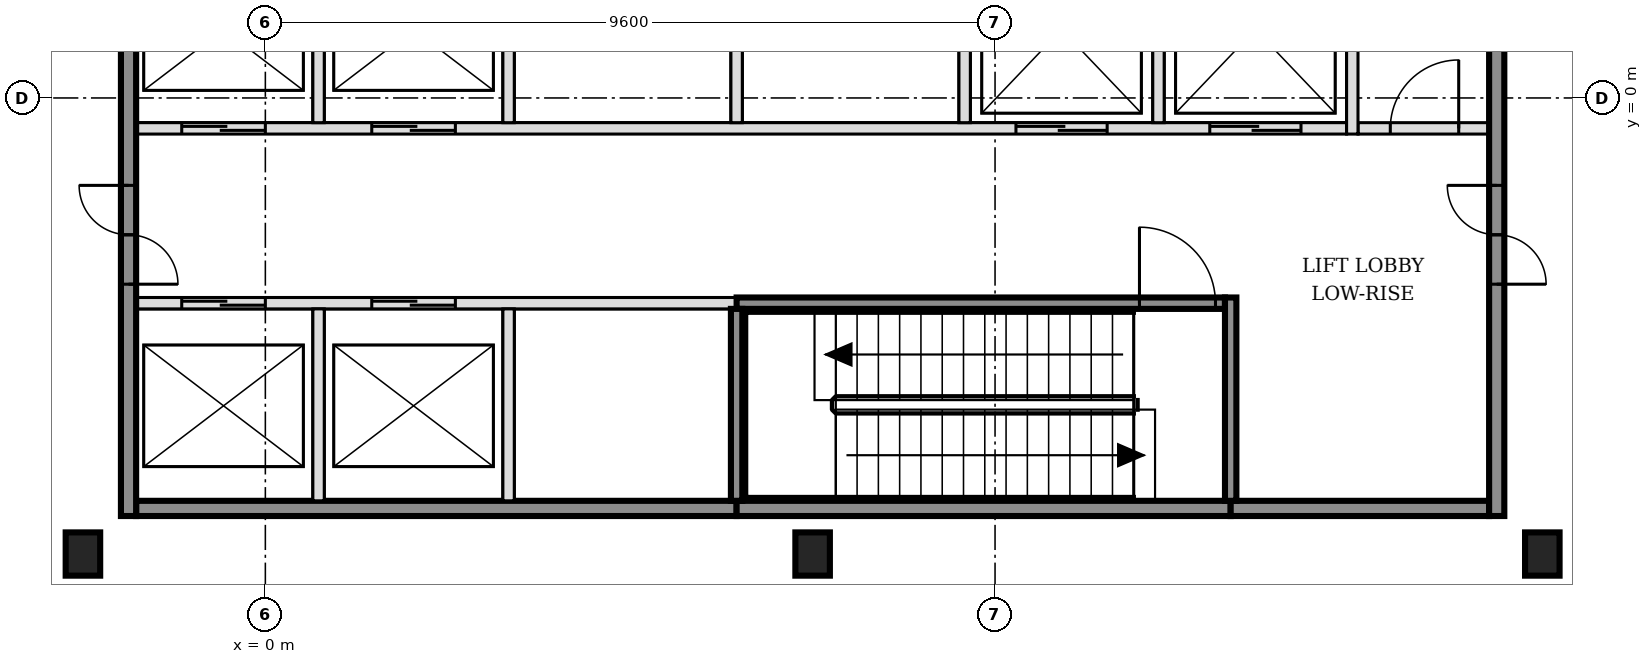
"""IFC4 building model, lengths in metres.
Left out: names, types, materials, properties, quantities, classifications, styles, units other than length and angle.
Written with IfcOpenShell. Run it as: python <this file> out.ifc"""

import sys

from ifc_helpers import new_model, si_unit, direction, frame, frame_2d, origin, origin_2d, place, context, subcontext, project, spatial, rectangle, i_section, extrude, element, fill, save


model = new_model("IFC4")
c1 = context("Model", 3, precision=1e-05, world=origin(), true_north=direction((0.0, 1.0)))
c2 = subcontext(c1, "Body", "Model", "MODEL_VIEW")
j1 = project(units=[si_unit("LENGTHUNIT", "METRE"), si_unit("PLANEANGLEUNIT", "RADIAN")], contexts=[c1])
p1 = place(None, origin())
s1 = spatial("IfcSite", under=j1, at=p1, CompositionType="ELEMENT")
p2 = place(p1, origin())
s2 = spatial("IfcBuilding", under=s1, at=p2, CompositionType="ELEMENT")
p3 = place(p2, frame((0.0, 0.0, 21.0)))
s3 = spatial("IfcBuildingStorey", under=s2, at=p3, CompositionType="ELEMENT", Elevation=21.0)
for number, where, z_axis, x_axis in (
    (1, (-2.4, -6.0, -0.2), (0.0, 0.0, 1.0), (1.0, 0.0, 0.0)),
    (2, (7.2, -6.0, -0.2), (0.0, 0.0, 1.0), (1.0, 0.0, 0.0)),
    (3, (16.8, -6.0, -0.2), (0.0, 0.0, 1.0), (1.0, 0.0, 0.0)),
):
    element("IfcColumn", number, at=place(p3, frame(where, z_axis=z_axis, x_axis=x_axis)), inside=s3, PredefinedType="COLUMN", context=c2, shape_type="SweptSolid", body=[
        extrude(i_section(OverallWidth=0.454, OverallDepth=0.569, WebThickness=0.078, FlangeThickness=0.125, FilletRadius=0.015, at=origin_2d()), origin(), (0.0, 0.0, 1.0), 4.8),
    ])
p4 = place(p3, frame((-1.7, -5.4, 0.0), z_axis=(0.0, 0.0, 1.0), x_axis=(1.0, 0.0, 0.0)))
e4 = element("IfcWall", 4, at=p4, inside=s3, PredefinedType="SOLIDWALL", context=c2, shape_type="SweptSolid", body=[
    extrude(rectangle(XDim=7.9, YDim=0.2, at=frame_2d((3.95, 0.0))), origin(), (0.0, 0.0, 1.0), 4.6),
])
p5 = place(p3, frame((6.2, -5.4, 0.0), z_axis=(0.0, 0.0, 1.0), x_axis=(1.0, 0.0, 0.0)))
e5 = element("IfcWall", 5, at=p5, inside=s3, PredefinedType="SOLIDWALL", context=c2, shape_type="SweptSolid", body=[
    extrude(rectangle(XDim=6.5, YDim=0.2, at=frame_2d((3.25, 0.0))), origin(), (0.0, 0.0, 1.0), 4.6),
])
p6 = place(p3, frame((12.7, -5.4, 0.0), z_axis=(0.0, 0.0, 1.0), x_axis=(1.0, 0.0, 0.0)))
e6 = element("IfcWall", 6, at=p6, inside=s3, PredefinedType="SOLIDWALL", context=c2, shape_type="SweptSolid", body=[
    extrude(rectangle(XDim=3.4, YDim=0.2, at=frame_2d((1.7, 0.0))), origin(), (0.0, 0.0, 1.0), 4.6),
])
p7 = place(p3, frame((-1.7, -2.7, 0.0), z_axis=(0.0, 0.0, 1.0), x_axis=(1.0, 0.0, 0.0)))
e7 = element("IfcWall", 7, at=p7, inside=s3, PredefinedType="SOLIDWALL", context=c2, shape_type="SweptSolid", body=[
    extrude(rectangle(XDim=7.9, YDim=0.15, at=frame_2d((3.95, 0.0))), origin(), (0.0, 0.0, 1.0), 4.6),
])
p8 = place(p7, frame((0.6, 0.0, 0.0)))
e8 = element("IfcOpeningElement", 8, at=p8, cuts=e7, PredefinedType="OPENING", context=c2, shape_type="SweptSolid", body=[
    extrude(rectangle(XDim=1.1, YDim=2.1, at=frame_2d((0.55, 1.05))), frame((0.0, 0.085, 0.0), z_axis=(0.0, -1.0, 0.0), x_axis=(1.0, 0.0, 0.0)), (0.0, 0.0, 1.0), 0.17),
])
p9 = place(p7, frame((3.1, 0.0, 0.0)))
e9 = element("IfcOpeningElement", 9, at=p9, cuts=e7, PredefinedType="OPENING", context=c2, shape_type="SweptSolid", body=[
    extrude(rectangle(XDim=1.1, YDim=2.1, at=frame_2d((0.55, 1.05))), frame((0.0, 0.085, 0.0), z_axis=(0.0, -1.0, 0.0), x_axis=(1.0, 0.0, 0.0)), (0.0, 0.0, 1.0), 0.17),
])
p10 = place(p3, frame((6.2, -2.7, 0.0), z_axis=(0.0, 0.0, 1.0), x_axis=(1.0, 0.0, 0.0)))
e10 = element("IfcWall", 10, at=p10, inside=s3, PredefinedType="SOLIDWALL", context=c2, shape_type="SweptSolid", body=[
    extrude(rectangle(XDim=6.425, YDim=0.15, at=frame_2d((3.212, 0.0))), origin(), (0.0, 0.0, 1.0), 4.6),
])
p11 = place(p10, frame((5.3, 0.0, 0.0)))
e11 = element("IfcOpeningElement", 11, at=p11, cuts=e10, PredefinedType="OPENING", context=c2, shape_type="SweptSolid", body=[
    extrude(rectangle(XDim=1.0, YDim=2.1, at=frame_2d((0.5, 1.05))), frame((0.0, 0.085, 0.0), z_axis=(0.0, -1.0, 0.0), x_axis=(1.0, 0.0, 0.0)), (0.0, 0.0, 1.0), 0.17),
])
p12 = place(p3, frame((-1.7, -0.4, 0.0), z_axis=(0.0, 0.0, 1.0), x_axis=(1.0, 0.0, 0.0)))
e12 = element("IfcWall", 12, at=p12, inside=s3, PredefinedType="SOLIDWALL", context=c2, shape_type="SweptSolid", body=[
    extrude(rectangle(XDim=15.925, YDim=0.15, at=frame_2d((7.962, 0.0))), origin(), (0.0, 0.0, 1.0), 4.6),
])
p13 = place(p12, frame((0.6, 0.0, 0.0)))
e13 = element("IfcOpeningElement", 13, at=p13, cuts=e12, PredefinedType="OPENING", context=c2, shape_type="SweptSolid", body=[
    extrude(rectangle(XDim=1.1, YDim=2.1, at=frame_2d((0.55, 1.05))), frame((0.0, 0.085, 0.0), z_axis=(0.0, -1.0, 0.0), x_axis=(1.0, 0.0, 0.0)), (0.0, 0.0, 1.0), 0.17),
])
p14 = place(p12, frame((3.1, 0.0, 0.0)))
e14 = element("IfcOpeningElement", 14, at=p14, cuts=e12, PredefinedType="OPENING", context=c2, shape_type="SweptSolid", body=[
    extrude(rectangle(XDim=1.1, YDim=2.1, at=frame_2d((0.55, 1.05))), frame((0.0, 0.085, 0.0), z_axis=(0.0, -1.0, 0.0), x_axis=(1.0, 0.0, 0.0)), (0.0, 0.0, 1.0), 0.17),
])
p15 = place(p12, frame((11.575, 0.0, 0.0)))
e15 = element("IfcOpeningElement", 15, at=p15, cuts=e12, PredefinedType="OPENING", context=c2, shape_type="SweptSolid", body=[
    extrude(rectangle(XDim=1.2, YDim=2.1, at=frame_2d((0.6, 1.05))), frame((0.0, 0.085, 0.0), z_axis=(0.0, -1.0, 0.0), x_axis=(1.0, 0.0, 0.0)), (0.0, 0.0, 1.0), 0.17),
])
p16 = place(p12, frame((14.125, 0.0, 0.0)))
e16 = element("IfcOpeningElement", 16, at=p16, cuts=e12, PredefinedType="OPENING", context=c2, shape_type="SweptSolid", body=[
    extrude(rectangle(XDim=1.2, YDim=2.1, at=frame_2d((0.6, 1.05))), frame((0.0, 0.085, 0.0), z_axis=(0.0, -1.0, 0.0), x_axis=(1.0, 0.0, 0.0)), (0.0, 0.0, 1.0), 0.17),
])
p17 = place(p3, frame((14.375, -0.4, 0.0), z_axis=(0.0, 0.0, 1.0), x_axis=(1.0, 0.0, 0.0)))
e17 = element("IfcWall", 17, at=p17, inside=s3, PredefinedType="PARTITIONING", context=c2, shape_type="SweptSolid", body=[
    extrude(rectangle(XDim=1.725, YDim=0.15, at=frame_2d((0.863, 0.0))), origin(), (0.0, 0.0, 1.0), 4.6),
])
p18 = place(p17, frame((0.425, 0.0, 0.0)))
e18 = element("IfcOpeningElement", 18, at=p18, cuts=e17, PredefinedType="OPENING", context=c2, shape_type="SweptSolid", body=[
    extrude(rectangle(XDim=0.9, YDim=2.1, at=frame_2d((0.45, 1.05))), frame((0.0, 0.085, 0.0), z_axis=(0.0, -1.0, 0.0), x_axis=(1.0, 0.0, 0.0)), (0.0, 0.0, 1.0), 0.17),
])
p19 = place(p3, frame((-1.8, -5.5, 0.0), z_axis=(0.0, 0.0, 1.0), x_axis=(0.0, 1.0, 0.0)))
e19 = element("IfcWall", 19, at=p19, inside=s3, PredefinedType="SOLIDWALL", context=c2, shape_type="SweptSolid", body=[
    extrude(rectangle(XDim=15.8, YDim=0.2, at=frame_2d((7.9, 0.0))), origin(), (0.0, 0.0, 1.0), 4.6),
])
p20 = place(p19, frame((3.05, 0.0, 0.0)))
e20 = element("IfcOpeningElement", 20, at=p20, cuts=e19, PredefinedType="OPENING", context=c2, shape_type="SweptSolid", body=[
    extrude(rectangle(XDim=1.3, YDim=2.1, at=frame_2d((0.65, 1.05))), frame((0.0, 0.11, 0.0), z_axis=(0.0, -1.0, 0.0), x_axis=(1.0, 0.0, 0.0)), (0.0, 0.0, 1.0), 0.22),
])
p21 = place(p19, frame((11.45, 0.0, 0.0)))
e21 = element("IfcOpeningElement", 21, at=p21, cuts=e19, PredefinedType="OPENING", context=c2, shape_type="SweptSolid", body=[
    extrude(rectangle(XDim=1.3, YDim=2.1, at=frame_2d((0.65, 1.05))), frame((0.0, 0.11, 0.0), z_axis=(0.0, -1.0, 0.0), x_axis=(1.0, 0.0, 0.0)), (0.0, 0.0, 1.0), 0.22),
])
p22 = place(p3, frame((0.7, -5.3, 0.0), z_axis=(0.0, 0.0, 1.0), x_axis=(0.0, 1.0, 0.0)))
e22 = element("IfcWall", 22, at=p22, inside=s3, PredefinedType="SOLIDWALL", context=c2, shape_type="SweptSolid", body=[
    extrude(rectangle(XDim=2.525, YDim=0.15, at=frame_2d((1.263, 0.0))), origin(), (0.0, 0.0, 1.0), 4.6),
])
p23 = place(p3, frame((0.7, -0.325, 0.0), z_axis=(0.0, 0.0, 1.0), x_axis=(0.0, 1.0, 0.0)))
e23 = element("IfcWall", 23, at=p23, inside=s3, PredefinedType="SOLIDWALL", context=c2, shape_type="SweptSolid", body=[
    extrude(rectangle(XDim=2.45, YDim=0.15, at=frame_2d((1.225, 0.0))), origin(), (0.0, 0.0, 1.0), 4.6),
])
p24 = place(p3, frame((3.2, -5.3, 0.0), z_axis=(0.0, 0.0, 1.0), x_axis=(0.0, 1.0, 0.0)))
e24 = element("IfcWall", 24, at=p24, inside=s3, PredefinedType="SOLIDWALL", context=c2, shape_type="SweptSolid", body=[
    extrude(rectangle(XDim=2.525, YDim=0.15, at=frame_2d((1.263, 0.0))), origin(), (0.0, 0.0, 1.0), 4.6),
])
p25 = place(p3, frame((3.2, -0.325, 0.0), z_axis=(0.0, 0.0, 1.0), x_axis=(0.0, 1.0, 0.0)))
e25 = element("IfcWall", 25, at=p25, inside=s3, PredefinedType="SOLIDWALL", context=c2, shape_type="SweptSolid", body=[
    extrude(rectangle(XDim=2.45, YDim=0.15, at=frame_2d((1.225, 0.0))), origin(), (0.0, 0.0, 1.0), 4.6),
])
p26 = place(p3, frame((6.2, -5.3, 0.0), z_axis=(0.0, 0.0, 1.0), x_axis=(0.0, 1.0, 0.0)))
e26 = element("IfcWall", 26, at=p26, inside=s3, PredefinedType="SOLIDWALL", context=c2, shape_type="SweptSolid", body=[
    extrude(rectangle(XDim=2.525, YDim=0.15, at=frame_2d((1.263, 0.0))), origin(), (0.0, 0.0, 1.0), 4.6),
])
for number, where, z_axis, x_axis in (
    (27, (6.2, -0.325, 0.0), (0.0, 0.0, 1.0), (0.0, 1.0, 0.0)),
    (28, (9.2, -0.325, 0.0), (0.0, 0.0, 1.0), (0.0, 1.0, 0.0)),
    (29, (11.75, -0.325, 0.0), (0.0, 0.0, 1.0), (0.0, 1.0, 0.0)),
):
    element("IfcWall", number, at=place(p3, frame(where, z_axis=z_axis, x_axis=x_axis)), inside=s3, PredefinedType="SOLIDWALL", context=c2, shape_type="SweptSolid", body=[
        extrude(rectangle(XDim=2.45, YDim=0.15, at=frame_2d((1.225, 0.0))), origin(), (0.0, 0.0, 1.0), 4.6),
    ])
p27 = place(p3, frame((12.7, -5.3, 0.0), z_axis=(0.0, 0.0, 1.0), x_axis=(0.0, 1.0, 0.0)))
e30 = element("IfcWall", 30, at=p27, inside=s3, PredefinedType="SOLIDWALL", context=c2, shape_type="SweptSolid", body=[
    extrude(rectangle(XDim=2.675, YDim=0.15, at=frame_2d((1.337, 0.0))), origin(), (0.0, 0.0, 1.0), 4.6),
])
p28 = place(p3, frame((14.3, -0.475, 0.0), z_axis=(0.0, 0.0, 1.0), x_axis=(0.0, 1.0, 0.0)))
e31 = element("IfcWall", 31, at=p28, inside=s3, PredefinedType="SOLIDWALL", context=c2, shape_type="SweptSolid", body=[
    extrude(rectangle(XDim=2.75, YDim=0.15, at=frame_2d((1.375, 0.0))), origin(), (0.0, 0.0, 1.0), 4.6),
])
p29 = place(p3, frame((16.2, -5.5, 0.0), z_axis=(0.0, 0.0, 1.0), x_axis=(0.0, 1.0, 0.0)))
e32 = element("IfcWall", 32, at=p29, inside=s3, PredefinedType="SOLIDWALL", context=c2, shape_type="SweptSolid", body=[
    extrude(rectangle(XDim=15.8, YDim=0.2, at=frame_2d((7.9, 0.0))), origin(), (0.0, 0.0, 1.0), 4.6),
])
p30 = place(p29, frame((3.05, 0.0, 0.0)))
e33 = element("IfcOpeningElement", 33, at=p30, cuts=e32, PredefinedType="OPENING", context=c2, shape_type="SweptSolid", body=[
    extrude(rectangle(XDim=1.3, YDim=2.1, at=frame_2d((0.65, 1.05))), frame((0.0, 0.11, 0.0), z_axis=(0.0, -1.0, 0.0), x_axis=(1.0, 0.0, 0.0)), (0.0, 0.0, 1.0), 0.22),
])
p31 = place(p29, frame((11.45, 0.0, 0.0)))
e34 = element("IfcOpeningElement", 34, at=p31, cuts=e32, PredefinedType="OPENING", context=c2, shape_type="SweptSolid", body=[
    extrude(rectangle(XDim=1.3, YDim=2.1, at=frame_2d((0.65, 1.05))), frame((0.0, 0.11, 0.0), z_axis=(0.0, -1.0, 0.0), x_axis=(1.0, 0.0, 0.0)), (0.0, 0.0, 1.0), 0.22),
])
p32 = place(p8, origin())
e35 = element("IfcDoor", 35, at=p32, inside=s3, OperationType="DOUBLE_DOOR_SLIDING", PredefinedType="DOOR", context=c2, shape_type="SweptSolid", body=[
    extrude(rectangle(XDim=1.1, YDim=2.1, at=frame_2d((0.55, 1.05))), frame((0.0, 0.025, 0.0), z_axis=(0.0, -1.0, 0.0), x_axis=(1.0, 0.0, 0.0)), (0.0, 0.0, 1.0), 0.05),
])
fill(e8, e35)
p33 = place(p9, origin())
e36 = element("IfcDoor", 36, at=p33, inside=s3, OperationType="DOUBLE_DOOR_SLIDING", PredefinedType="DOOR", context=c2, shape_type="SweptSolid", body=[
    extrude(rectangle(XDim=1.1, YDim=2.1, at=frame_2d((0.55, 1.05))), frame((0.0, 0.025, 0.0), z_axis=(0.0, -1.0, 0.0), x_axis=(1.0, 0.0, 0.0)), (0.0, 0.0, 1.0), 0.05),
])
fill(e9, e36)
p34 = place(p13, origin())
e37 = element("IfcDoor", 37, at=p34, inside=s3, OperationType="DOUBLE_DOOR_SLIDING", PredefinedType="DOOR", context=c2, shape_type="SweptSolid", body=[
    extrude(rectangle(XDim=1.1, YDim=2.1, at=frame_2d((0.55, 1.05))), frame((0.0, 0.025, 0.0), z_axis=(0.0, -1.0, 0.0), x_axis=(1.0, 0.0, 0.0)), (0.0, 0.0, 1.0), 0.05),
])
fill(e13, e37)
p35 = place(p14, origin())
e38 = element("IfcDoor", 38, at=p35, inside=s3, OperationType="DOUBLE_DOOR_SLIDING", PredefinedType="DOOR", context=c2, shape_type="SweptSolid", body=[
    extrude(rectangle(XDim=1.1, YDim=2.1, at=frame_2d((0.55, 1.05))), frame((0.0, 0.025, 0.0), z_axis=(0.0, -1.0, 0.0), x_axis=(1.0, 0.0, 0.0)), (0.0, 0.0, 1.0), 0.05),
])
fill(e14, e38)
p36 = place(p15, origin())
e39 = element("IfcDoor", 39, at=p36, inside=s3, OperationType="DOUBLE_DOOR_SLIDING", PredefinedType="DOOR", context=c2, shape_type="SweptSolid", body=[
    extrude(rectangle(XDim=1.2, YDim=2.1, at=frame_2d((0.6, 1.05))), frame((0.0, 0.025, 0.0), z_axis=(0.0, -1.0, 0.0), x_axis=(1.0, 0.0, 0.0)), (0.0, 0.0, 1.0), 0.05),
])
fill(e15, e39)
p37 = place(p16, origin())
e40 = element("IfcDoor", 40, at=p37, inside=s3, OperationType="DOUBLE_DOOR_SLIDING", PredefinedType="DOOR", context=c2, shape_type="SweptSolid", body=[
    extrude(rectangle(XDim=1.2, YDim=2.1, at=frame_2d((0.6, 1.05))), frame((0.0, 0.025, 0.0), z_axis=(0.0, -1.0, 0.0), x_axis=(1.0, 0.0, 0.0)), (0.0, 0.0, 1.0), 0.05),
])
fill(e16, e40)
p38 = place(p11, origin())
e41 = element("IfcDoor", 41, at=p38, inside=s3, OperationType="SINGLE_SWING_LEFT", PredefinedType="DOOR", context=c2, shape_type="SweptSolid", body=[
    extrude(rectangle(XDim=1.0, YDim=2.1, at=frame_2d((0.5, 1.05))), frame((0.0, 0.025, 0.0), z_axis=(0.0, -1.0, 0.0), x_axis=(1.0, 0.0, 0.0)), (0.0, 0.0, 1.0), 0.05),
])
fill(e11, e41)
p39 = place(p20, origin())
e42 = element("IfcDoor", 42, at=p39, inside=s3, OperationType="DOUBLE_DOOR_SINGLE_SWING", PredefinedType="DOOR", context=c2, shape_type="SweptSolid", body=[
    extrude(rectangle(XDim=1.3, YDim=2.1, at=frame_2d((0.65, 1.05))), frame((0.0, 0.025, 0.0), z_axis=(0.0, -1.0, 0.0), x_axis=(1.0, 0.0, 0.0)), (0.0, 0.0, 1.0), 0.05),
])
fill(e20, e42)
p40 = place(p30, origin())
e43 = element("IfcDoor", 43, at=p40, inside=s3, OperationType="DOUBLE_DOOR_SINGLE_SWING", PredefinedType="DOOR", context=c2, shape_type="SweptSolid", body=[
    extrude(rectangle(XDim=1.3, YDim=2.1, at=frame_2d((0.65, 1.05))), frame((0.0, 0.025, 0.0), z_axis=(0.0, -1.0, 0.0), x_axis=(1.0, 0.0, 0.0)), (0.0, 0.0, 1.0), 0.05),
])
fill(e33, e43)
p41 = place(p18, origin())
e44 = element("IfcDoor", 44, at=p41, inside=s3, OperationType="SINGLE_SWING_RIGHT", PredefinedType="DOOR", context=c2, shape_type="SweptSolid", body=[
    extrude(rectangle(XDim=0.9, YDim=2.1, at=frame_2d((0.45, 1.05))), frame((0.0, 0.025, 0.0), z_axis=(0.0, -1.0, 0.0), x_axis=(1.0, 0.0, 0.0)), (0.0, 0.0, 1.0), 0.05),
])
fill(e18, e44)
save(model, sys.argv[1])
